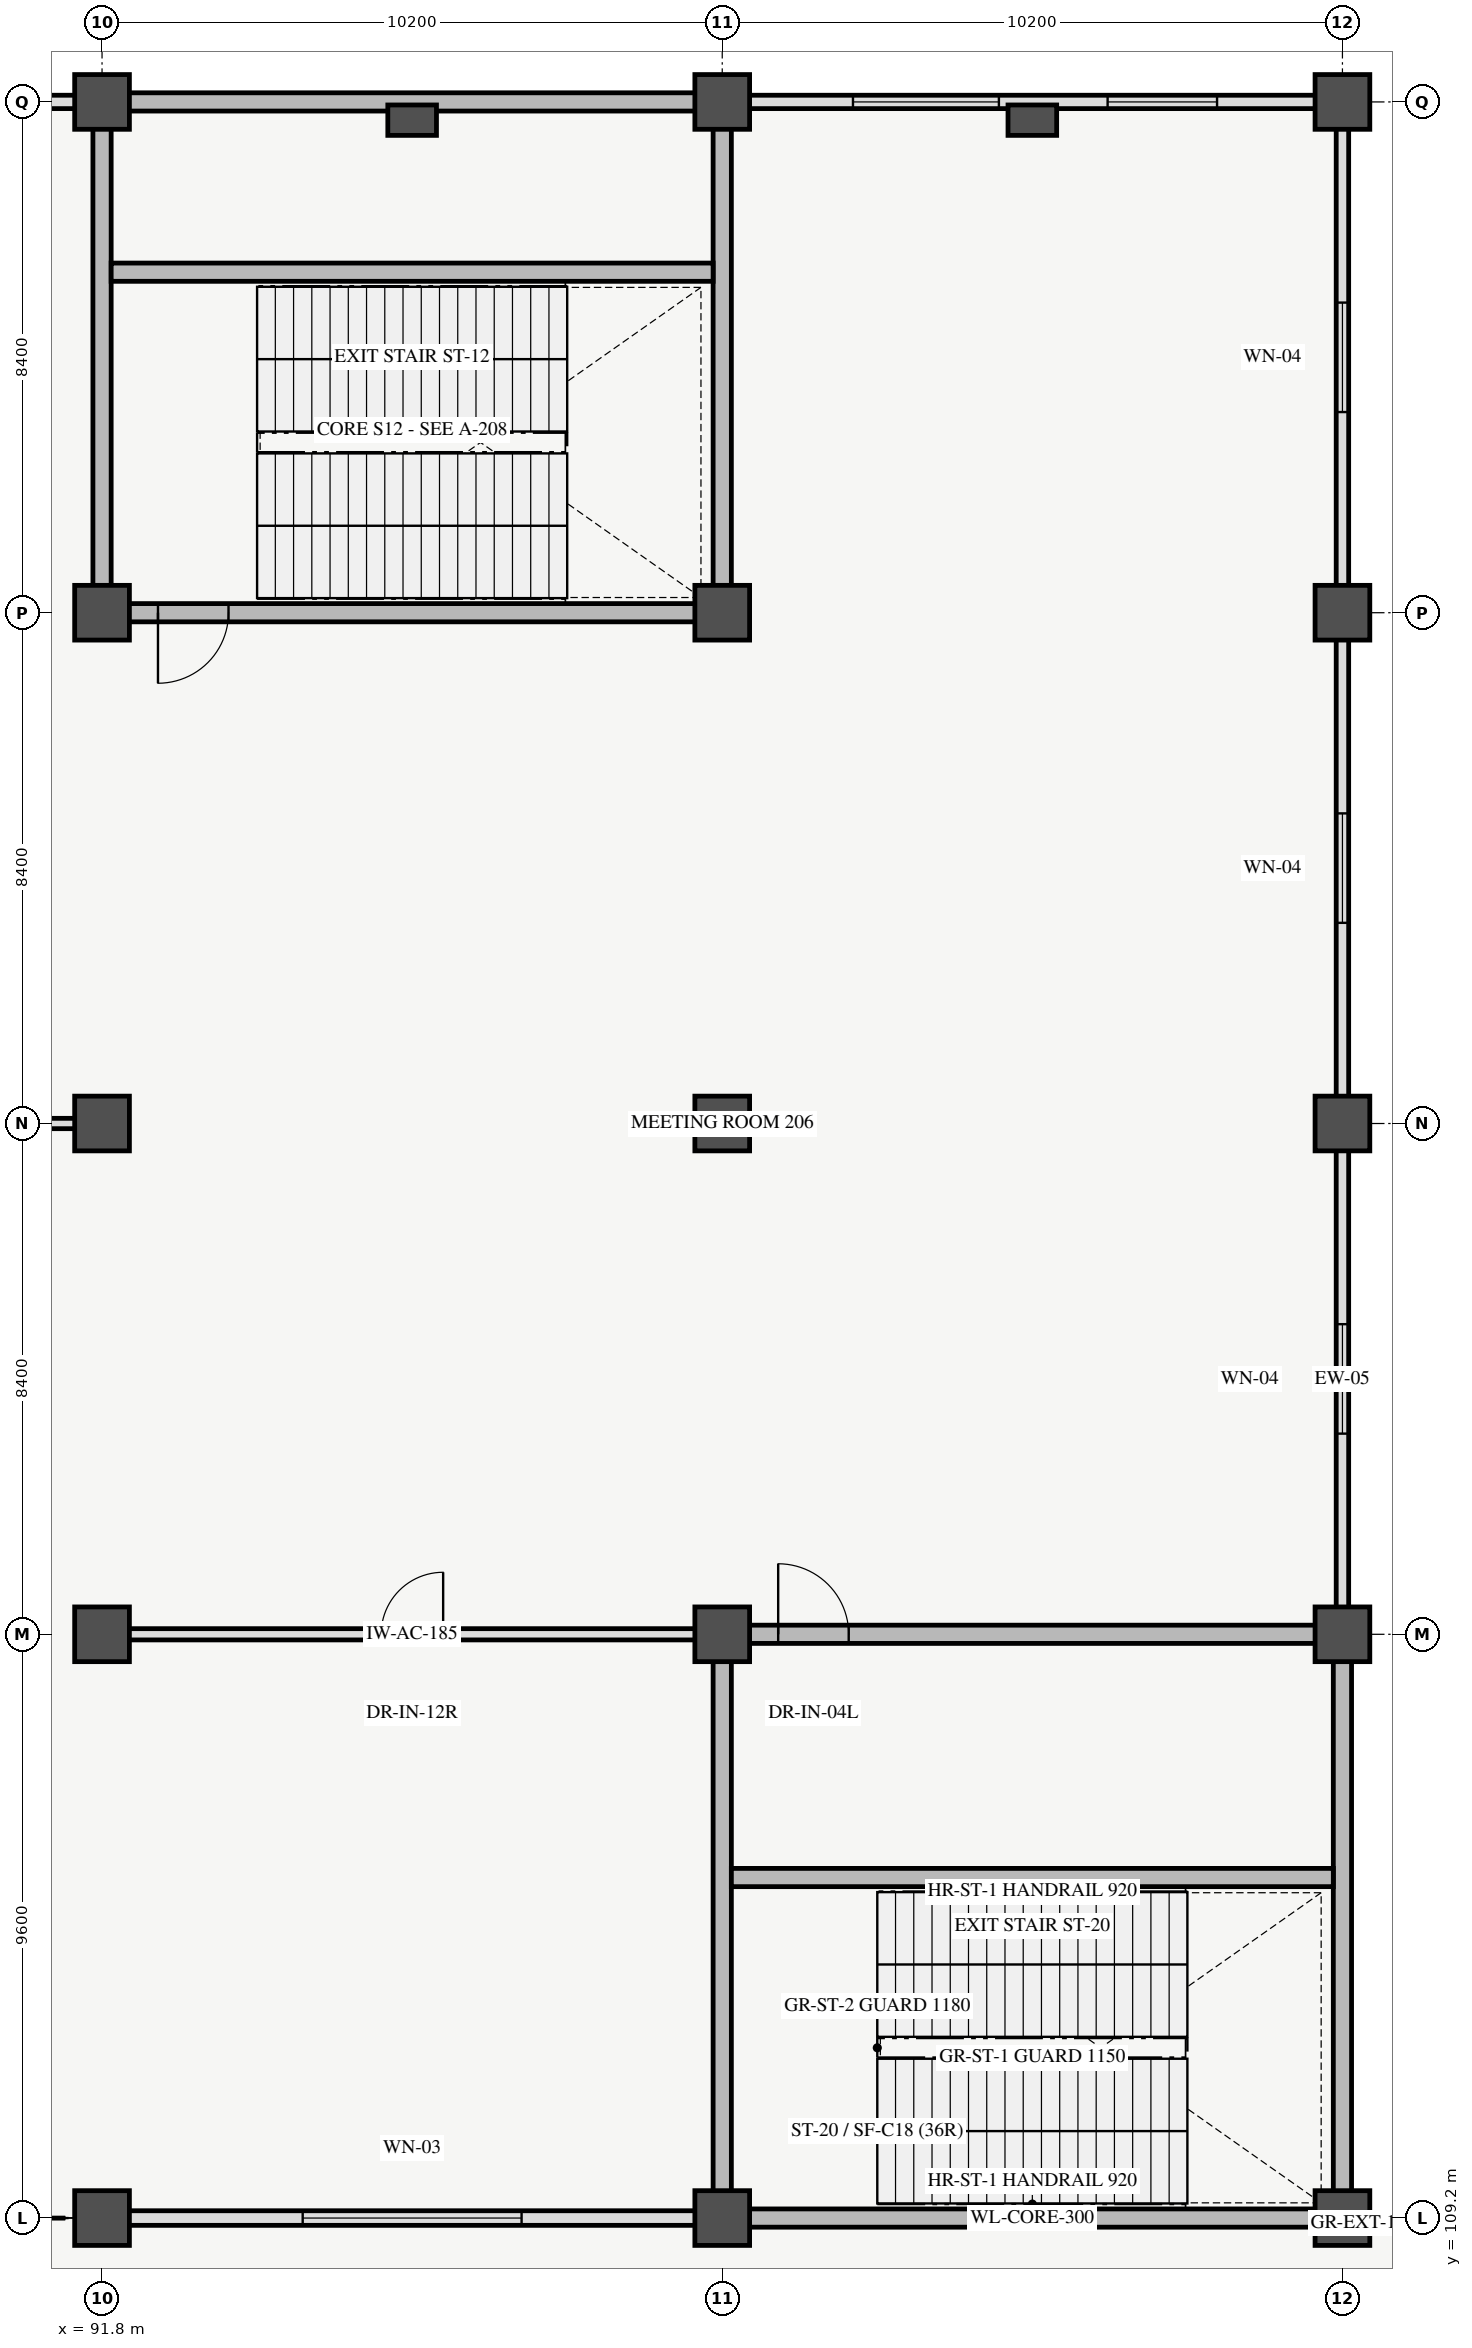
"""IFC4 building model, lengths in metres.
Left out: names, types, materials, properties, quantities, classifications, styles, units other than length and angle.
Written with IfcOpenShell. Run it as: python <this file> out.ifc"""

import sys

from ifc_helpers import new_model, si_unit, direction, frame, frame_2d, origin, origin_2d, place, context, subcontext, project, spatial, rectangle, extrude, element, fill, save


model = new_model("IFC4")
c1 = context("Model", 3, precision=1e-05, world=origin(), true_north=direction((0.0, 1.0)))
c2 = subcontext(c1, "Body", "Model", "MODEL_VIEW")
j1 = project(units=[si_unit("LENGTHUNIT", "METRE"), si_unit("PLANEANGLEUNIT", "RADIAN")], contexts=[c1])
p1 = place(None, origin())
s1 = spatial("IfcSite", under=j1, at=p1, CompositionType="ELEMENT")
p2 = place(p1, origin())
s2 = spatial("IfcBuilding", under=s1, at=p2, CompositionType="ELEMENT")
p3 = place(p2, frame((0.0, 0.0, 5.4)))
s3 = spatial("IfcBuildingStorey", under=s2, at=p3, CompositionType="ELEMENT", Elevation=5.4)
for number, where, z_axis, x_axis in (
    (1, (91.8, 109.2, 0.0), (0.0, 0.0, 1.0), (1.0, 0.0, 0.0)),
    (2, (91.8, 118.8, 0.0), (0.0, 0.0, 1.0), (1.0, 0.0, 0.0)),
    (3, (91.8, 127.2, 0.0), (0.0, 0.0, 1.0), (1.0, 0.0, 0.0)),
    (4, (91.8, 135.6, 0.0), (0.0, 0.0, 1.0), (1.0, 0.0, 0.0)),
    (5, (91.8, 144.0, 0.0), (0.0, 0.0, 1.0), (1.0, 0.0, 0.0)),
    (6, (102.0, 109.2, 0.0), (0.0, 0.0, 1.0), (1.0, 0.0, 0.0)),
    (7, (102.0, 118.8, 0.0), (0.0, 0.0, 1.0), (1.0, 0.0, 0.0)),
    (8, (102.0, 127.2, 0.0), (0.0, 0.0, 1.0), (1.0, 0.0, 0.0)),
    (9, (102.0, 135.6, 0.0), (0.0, 0.0, 1.0), (1.0, 0.0, 0.0)),
    (10, (102.0, 144.0, 0.0), (0.0, 0.0, 1.0), (1.0, 0.0, 0.0)),
    (11, (112.2, 109.2, 0.0), (0.0, 0.0, 1.0), (1.0, 0.0, 0.0)),
    (12, (112.2, 118.8, 0.0), (0.0, 0.0, 1.0), (1.0, 0.0, 0.0)),
    (13, (112.2, 127.2, 0.0), (0.0, 0.0, 1.0), (1.0, 0.0, 0.0)),
    (14, (112.2, 135.6, 0.0), (0.0, 0.0, 1.0), (1.0, 0.0, 0.0)),
    (15, (112.2, 144.0, 0.0), (0.0, 0.0, 1.0), (1.0, 0.0, 0.0)),
):
    element("IfcColumn", number, at=place(p3, frame(where, z_axis=z_axis, x_axis=x_axis)), inside=s3, PredefinedType="COLUMN", context=c2, shape_type="SweptSolid", body=[
        extrude(rectangle(XDim=0.9, YDim=0.9, at=origin_2d()), origin(), (0.0, 0.0, 1.0), 5.4),
    ])
for number, where, z_axis, x_axis in (
    (16, (96.9, 143.7, 0.0), (0.0, 0.0, 1.0), (1.0, 0.0, 0.0)),
    (17, (107.1, 143.7, 0.0), (0.0, 0.0, 1.0), (1.0, 0.0, 0.0)),
):
    element("IfcColumn", number, at=place(p3, frame(where, z_axis=z_axis, x_axis=x_axis)), inside=s3, PredefinedType="PILASTER", context=c2, shape_type="SweptSolid", body=[
        extrude(rectangle(XDim=0.8, YDim=0.5, at=origin_2d()), origin(), (0.0, 0.0, 1.0), 5.4),
    ])
p4 = place(p3, frame((81.84, 144.0, 0.0), z_axis=(0.0, 0.0, 1.0), x_axis=(1.0, 0.0, 0.0)))
e18 = element("IfcWall", 18, at=p4, inside=s3, PredefinedType="STANDARD", context=c2, shape_type="SweptSolid", body=[
    extrude(rectangle(XDim=9.72, YDim=0.22, at=frame_2d((4.86, 0.0))), origin(), (0.0, 0.0, 1.0), 4.32),
])
p5 = place(p4, frame((1.91, 0.0, 0.7)))
e19 = element("IfcOpeningElement", 19, at=p5, cuts=e18, PredefinedType="OPENING", context=c2, shape_type="SweptSolid", body=[
    extrude(rectangle(XDim=2.4, YDim=2.1, at=frame_2d((1.2, 1.05))), frame((0.0, 0.12, 0.0), z_axis=(0.0, -1.0, 0.0), x_axis=(1.0, 0.0, 0.0)), (0.0, 0.0, 1.0), 0.24),
])
p6 = place(p4, frame((6.098, 0.0, 0.85)))
e20 = element("IfcOpeningElement", 20, at=p6, cuts=e18, PredefinedType="OPENING", context=c2, shape_type="SweptSolid", body=[
    extrude(rectangle(XDim=1.8, YDim=1.8, at=frame_2d((0.9, 0.9))), frame((0.0, 0.12, 0.0), z_axis=(0.0, -1.0, 0.0), x_axis=(1.0, 0.0, 0.0)), (0.0, 0.0, 1.0), 0.24),
])
p7 = place(p3, frame((92.04, 109.2, 0.0), z_axis=(0.0, 0.0, 1.0), x_axis=(1.0, 0.0, 0.0)))
e21 = element("IfcWall", 21, at=p7, inside=s3, PredefinedType="STANDARD", context=c2, shape_type="SweptSolid", body=[
    extrude(rectangle(XDim=9.72, YDim=0.24, at=frame_2d((4.86, 0.0))), origin(), (0.0, 0.0, 1.0), 4.32),
])
p8 = place(p7, frame((3.06, 0.0, 0.9)))
e22 = element("IfcOpeningElement", 22, at=p8, cuts=e21, PredefinedType="OPENING", context=c2, shape_type="SweptSolid", body=[
    extrude(rectangle(XDim=3.6, YDim=2.1, at=frame_2d((1.8, 1.05))), frame((0.0, 0.13, 0.0), z_axis=(0.0, -1.0, 0.0), x_axis=(1.0, 0.0, 0.0)), (0.0, 0.0, 1.0), 0.26),
])
p9 = place(p3, frame((102.24, 144.0, 0.0), z_axis=(0.0, 0.0, 1.0), x_axis=(1.0, 0.0, 0.0)))
e23 = element("IfcWall", 23, at=p9, inside=s3, PredefinedType="STANDARD", context=c2, shape_type="SweptSolid", body=[
    extrude(rectangle(XDim=9.72, YDim=0.22, at=frame_2d((4.86, 0.0))), origin(), (0.0, 0.0, 1.0), 4.32),
])
p10 = place(p9, frame((1.91, 0.0, 0.7)))
e24 = element("IfcOpeningElement", 24, at=p10, cuts=e23, PredefinedType="OPENING", context=c2, shape_type="SweptSolid", body=[
    extrude(rectangle(XDim=2.4, YDim=2.1, at=frame_2d((1.2, 1.05))), frame((0.0, 0.12, 0.0), z_axis=(0.0, -1.0, 0.0), x_axis=(1.0, 0.0, 0.0)), (0.0, 0.0, 1.0), 0.24),
])
p11 = place(p9, frame((6.098, 0.0, 0.85)))
e25 = element("IfcOpeningElement", 25, at=p11, cuts=e23, PredefinedType="OPENING", context=c2, shape_type="SweptSolid", body=[
    extrude(rectangle(XDim=1.8, YDim=1.8, at=frame_2d((0.9, 0.9))), frame((0.0, 0.12, 0.0), z_axis=(0.0, -1.0, 0.0), x_axis=(1.0, 0.0, 0.0)), (0.0, 0.0, 1.0), 0.24),
])
p12 = place(p3, frame((112.2, 119.04, 0.0), z_axis=(0.0, 0.0, 1.0), x_axis=(0.0, 1.0, 0.0)))
e26 = element("IfcWall", 26, at=p12, inside=s3, PredefinedType="STANDARD", context=c2, shape_type="SweptSolid", body=[
    extrude(rectangle(XDim=7.92, YDim=0.205, at=frame_2d((3.96, 0.0))), origin(), (0.0, 0.0, 1.0), 4.32),
])
p13 = place(p12, frame((3.06, 0.0, 0.95)))
e27 = element("IfcOpeningElement", 27, at=p13, cuts=e26, PredefinedType="OPENING", context=c2, shape_type="SweptSolid", body=[
    extrude(rectangle(XDim=1.8, YDim=1.8, at=frame_2d((0.9, 0.9))), frame((0.0, 0.113, 0.0), z_axis=(0.0, -1.0, 0.0), x_axis=(1.0, 0.0, 0.0)), (0.0, 0.0, 1.0), 0.225),
])
p14 = place(p3, frame((112.2, 127.44, 0.0), z_axis=(0.0, 0.0, 1.0), x_axis=(0.0, 1.0, 0.0)))
e28 = element("IfcWall", 28, at=p14, inside=s3, PredefinedType="STANDARD", context=c2, shape_type="SweptSolid", body=[
    extrude(rectangle(XDim=7.92, YDim=0.205, at=frame_2d((3.96, 0.0))), origin(), (0.0, 0.0, 1.0), 4.32),
])
p15 = place(p14, frame((3.06, 0.0, 0.95)))
e29 = element("IfcOpeningElement", 29, at=p15, cuts=e28, PredefinedType="OPENING", context=c2, shape_type="SweptSolid", body=[
    extrude(rectangle(XDim=1.8, YDim=1.8, at=frame_2d((0.9, 0.9))), frame((0.0, 0.113, 0.0), z_axis=(0.0, -1.0, 0.0), x_axis=(1.0, 0.0, 0.0)), (0.0, 0.0, 1.0), 0.225),
])
p16 = place(p3, frame((112.2, 135.84, 0.0), z_axis=(0.0, 0.0, 1.0), x_axis=(0.0, 1.0, 0.0)))
e30 = element("IfcWall", 30, at=p16, inside=s3, PredefinedType="STANDARD", context=c2, shape_type="SweptSolid", body=[
    extrude(rectangle(XDim=7.92, YDim=0.205, at=frame_2d((3.96, 0.0))), origin(), (0.0, 0.0, 1.0), 4.32),
])
p17 = place(p16, frame((3.06, 0.0, 0.95)))
e31 = element("IfcOpeningElement", 31, at=p17, cuts=e30, PredefinedType="OPENING", context=c2, shape_type="SweptSolid", body=[
    extrude(rectangle(XDim=1.8, YDim=1.8, at=frame_2d((0.9, 0.9))), frame((0.0, 0.113, 0.0), z_axis=(0.0, -1.0, 0.0), x_axis=(1.0, 0.0, 0.0)), (0.0, 0.0, 1.0), 0.225),
])
p18 = place(p3, frame((91.8, 135.6, 0.0), z_axis=(0.0, 0.0, 1.0), x_axis=(1.0, 0.0, 0.0)))
e32 = element("IfcWall", 32, at=p18, inside=s3, PredefinedType="SHEAR", context=c2, shape_type="SweptSolid", body=[
    extrude(rectangle(XDim=10.2, YDim=0.3, at=frame_2d((5.1, 0.0))), origin(), (0.0, 0.0, 1.0), 5.4),
])
p19 = place(p18, frame((0.92, 0.0, 0.0)))
e33 = element("IfcOpeningElement", 33, at=p19, cuts=e32, PredefinedType="OPENING", context=c2, shape_type="SweptSolid", body=[
    extrude(rectangle(XDim=1.16, YDim=2.2, at=frame_2d((0.58, 1.1))), frame((0.0, 0.16, 0.0), z_axis=(0.0, -1.0, 0.0), x_axis=(1.0, 0.0, 0.0)), (0.0, 0.0, 1.0), 0.32),
])
p20 = place(p3, frame((91.8, 144.0, 0.0), z_axis=(0.0, 0.0, 1.0), x_axis=(1.0, 0.0, 0.0)))
e34 = element("IfcWall", 34, at=p20, inside=s3, PredefinedType="SHEAR", context=c2, shape_type="SweptSolid", body=[
    extrude(rectangle(XDim=10.2, YDim=0.3, at=frame_2d((5.1, 0.0))), origin(), (0.0, 0.0, 1.0), 5.4),
])
for number, where, z_axis, x_axis in (
    (35, (91.8, 135.6, 0.0), (0.0, 0.0, 1.0), (0.0, 1.0, 0.0)),
    (36, (102.0, 135.6, 0.0), (0.0, 0.0, 1.0), (0.0, 1.0, 0.0)),
):
    element("IfcWall", number, at=place(p3, frame(where, z_axis=z_axis, x_axis=x_axis)), inside=s3, PredefinedType="SHEAR", context=c2, shape_type="SweptSolid", body=[
        extrude(rectangle(XDim=8.4, YDim=0.3, at=frame_2d((4.2, 0.0))), origin(), (0.0, 0.0, 1.0), 5.4),
    ])
p21 = place(p3, frame((91.95, 141.2, 0.0), z_axis=(0.0, 0.0, 1.0), x_axis=(1.0, 0.0, 0.0)))
e37 = element("IfcWall", 37, at=p21, inside=s3, PredefinedType="SHEAR", context=c2, shape_type="SweptSolid", body=[
    extrude(rectangle(XDim=9.9, YDim=0.3, at=frame_2d((4.95, 0.0))), origin(), (0.0, 0.0, 1.0), 5.4),
])
p22 = place(p3, frame((102.0, 109.2, 0.0), z_axis=(0.0, 0.0, 1.0), x_axis=(1.0, 0.0, 0.0)))
e38 = element("IfcWall", 38, at=p22, inside=s3, PredefinedType="SHEAR", context=c2, shape_type="SweptSolid", body=[
    extrude(rectangle(XDim=10.2, YDim=0.3, at=frame_2d((5.1, 0.0))), origin(), (0.0, 0.0, 1.0), 5.4),
])
p23 = place(p3, frame((102.0, 118.8, 0.0), z_axis=(0.0, 0.0, 1.0), x_axis=(1.0, 0.0, 0.0)))
e39 = element("IfcWall", 39, at=p23, inside=s3, PredefinedType="SHEAR", context=c2, shape_type="SweptSolid", body=[
    extrude(rectangle(XDim=10.2, YDim=0.3, at=frame_2d((5.1, 0.0))), origin(), (0.0, 0.0, 1.0), 5.4),
])
p24 = place(p23, frame((0.92, 0.0, 0.0)))
e40 = element("IfcOpeningElement", 40, at=p24, cuts=e39, PredefinedType="OPENING", context=c2, shape_type="SweptSolid", body=[
    extrude(rectangle(XDim=1.16, YDim=2.2, at=frame_2d((0.58, 1.1))), frame((0.0, 0.16, 0.0), z_axis=(0.0, -1.0, 0.0), x_axis=(1.0, 0.0, 0.0)), (0.0, 0.0, 1.0), 0.32),
])
for number, where, z_axis, x_axis in (
    (41, (102.0, 109.2, 0.0), (0.0, 0.0, 1.0), (0.0, 1.0, 0.0)),
    (42, (112.2, 109.2, 0.0), (0.0, 0.0, 1.0), (0.0, 1.0, 0.0)),
):
    element("IfcWall", number, at=place(p3, frame(where, z_axis=z_axis, x_axis=x_axis)), inside=s3, PredefinedType="SHEAR", context=c2, shape_type="SweptSolid", body=[
        extrude(rectangle(XDim=9.6, YDim=0.3, at=frame_2d((4.8, 0.0))), origin(), (0.0, 0.0, 1.0), 5.4),
    ])
p25 = place(p3, frame((102.15, 114.8, 0.0), z_axis=(0.0, 0.0, 1.0), x_axis=(1.0, 0.0, 0.0)))
e43 = element("IfcWall", 43, at=p25, inside=s3, PredefinedType="SHEAR", context=c2, shape_type="SweptSolid", body=[
    extrude(rectangle(XDim=9.9, YDim=0.3, at=frame_2d((4.95, 0.0))), origin(), (0.0, 0.0, 1.0), 5.4),
])
p26 = place(p3, frame((82.0, 127.2, 0.0), z_axis=(0.0, 0.0, 1.0), x_axis=(1.0, 0.0, 0.0)))
e44 = element("IfcWall", 44, at=p26, inside=s3, PredefinedType="MOVABLE", context=c2, shape_type="SweptSolid", body=[
    extrude(rectangle(XDim=9.4, YDim=0.17, at=frame_2d((4.7, 0.0))), origin(), (0.0, 0.0, 1.0), 4.2),
])
p27 = place(p26, frame((3.675, 0.0, 0.0)))
e45 = element("IfcOpeningElement", 45, at=p27, cuts=e44, PredefinedType="OPENING", context=c2, shape_type="SweptSolid", body=[
    extrude(rectangle(XDim=2.05, YDim=2.36, at=frame_2d((1.025, 1.18))), frame((0.0, 0.095, 0.0), z_axis=(0.0, -1.0, 0.0), x_axis=(1.0, 0.0, 0.0)), (0.0, 0.0, 1.0), 0.19),
])
p28 = place(p3, frame((92.2, 118.8, 0.0), z_axis=(0.0, 0.0, 1.0), x_axis=(1.0, 0.0, 0.0)))
e46 = element("IfcWall", 46, at=p28, inside=s3, PredefinedType="PARTITIONING", context=c2, shape_type="SweptSolid", body=[
    extrude(rectangle(XDim=9.4, YDim=0.185, at=frame_2d((4.7, 0.0))), origin(), (0.0, 0.0, 1.0), 4.2),
])
p29 = place(p28, frame((4.19, 0.0, 0.0)))
e47 = element("IfcOpeningElement", 47, at=p29, cuts=e46, PredefinedType="OPENING", context=c2, shape_type="SweptSolid", body=[
    extrude(rectangle(XDim=1.02, YDim=2.12, at=frame_2d((0.51, 1.06))), frame((0.0, 0.103, 0.0), z_axis=(0.0, -1.0, 0.0), x_axis=(1.0, 0.0, 0.0)), (0.0, 0.0, 1.0), 0.205),
])
p30 = place(p8, origin())
e48 = element("IfcWindow", 48, at=p30, inside=s3, PartitioningType="TRIPLE_PANEL_VERTICAL", PredefinedType="WINDOW", context=c2, shape_type="SweptSolid", body=[
    extrude(rectangle(XDim=3.6, YDim=2.1, at=frame_2d((1.8, 1.05))), frame((0.0, 0.03, 0.0), z_axis=(0.0, -1.0, 0.0), x_axis=(1.0, 0.0, 0.0)), (0.0, 0.0, 1.0), 0.06),
])
fill(e22, e48)
p31 = place(p10, origin())
e49 = element("IfcWindow", 49, at=p31, inside=s3, PartitioningType="DOUBLE_PANEL_VERTICAL", PredefinedType="WINDOW", context=c2, shape_type="SweptSolid", body=[
    extrude(rectangle(XDim=2.4, YDim=2.1, at=frame_2d((1.2, 1.05))), frame((0.0, 0.03, 0.0), z_axis=(0.0, -1.0, 0.0), x_axis=(1.0, 0.0, 0.0)), (0.0, 0.0, 1.0), 0.06),
])
fill(e24, e49)
p32 = place(p11, origin())
e50 = element("IfcWindow", 50, at=p32, inside=s3, PartitioningType="DOUBLE_PANEL_VERTICAL", PredefinedType="WINDOW", context=c2, shape_type="SweptSolid", body=[
    extrude(rectangle(XDim=1.8, YDim=1.8, at=frame_2d((0.9, 0.9))), frame((0.0, 0.03, 0.0), z_axis=(0.0, -1.0, 0.0), x_axis=(1.0, 0.0, 0.0)), (0.0, 0.0, 1.0), 0.06),
])
fill(e25, e50)
p33 = place(p13, origin())
e51 = element("IfcWindow", 51, at=p33, inside=s3, PartitioningType="DOUBLE_PANEL_VERTICAL", PredefinedType="WINDOW", context=c2, shape_type="SweptSolid", body=[
    extrude(rectangle(XDim=1.8, YDim=1.8, at=frame_2d((0.9, 0.9))), frame((0.0, 0.03, 0.0), z_axis=(0.0, -1.0, 0.0), x_axis=(1.0, 0.0, 0.0)), (0.0, 0.0, 1.0), 0.06),
])
fill(e27, e51)
p34 = place(p15, origin())
e52 = element("IfcWindow", 52, at=p34, inside=s3, PartitioningType="DOUBLE_PANEL_VERTICAL", PredefinedType="WINDOW", context=c2, shape_type="SweptSolid", body=[
    extrude(rectangle(XDim=1.8, YDim=1.8, at=frame_2d((0.9, 0.9))), frame((0.0, 0.03, 0.0), z_axis=(0.0, -1.0, 0.0), x_axis=(1.0, 0.0, 0.0)), (0.0, 0.0, 1.0), 0.06),
])
fill(e29, e52)
p35 = place(p17, origin())
e53 = element("IfcWindow", 53, at=p35, inside=s3, PartitioningType="DOUBLE_PANEL_VERTICAL", PredefinedType="WINDOW", context=c2, shape_type="SweptSolid", body=[
    extrude(rectangle(XDim=1.8, YDim=1.8, at=frame_2d((0.9, 0.9))), frame((0.0, 0.03, 0.0), z_axis=(0.0, -1.0, 0.0), x_axis=(1.0, 0.0, 0.0)), (0.0, 0.0, 1.0), 0.06),
])
fill(e31, e53)
p36 = place(p19, origin())
e54 = element("IfcDoor", 54, at=p36, inside=s3, OperationType="SINGLE_SWING_LEFT", PredefinedType="DOOR", context=c2, shape_type="SweptSolid", body=[
    extrude(rectangle(XDim=1.16, YDim=2.2, at=frame_2d((0.58, 1.1))), frame((0.0, 0.025, 0.0), z_axis=(0.0, -1.0, 0.0), x_axis=(1.0, 0.0, 0.0)), (0.0, 0.0, 1.0), 0.05),
])
fill(e33, e54)
p37 = place(p24, origin())
e55 = element("IfcDoor", 55, at=p37, inside=s3, OperationType="SINGLE_SWING_LEFT", PredefinedType="DOOR", context=c2, shape_type="SweptSolid", body=[
    extrude(rectangle(XDim=1.16, YDim=2.2, at=frame_2d((0.58, 1.1))), frame((0.0, 0.025, 0.0), z_axis=(0.0, -1.0, 0.0), x_axis=(1.0, 0.0, 0.0)), (0.0, 0.0, 1.0), 0.05),
])
fill(e40, e55)
p38 = place(p29, origin())
e56 = element("IfcDoor", 56, at=p38, inside=s3, OperationType="SINGLE_SWING_RIGHT", PredefinedType="DOOR", context=c2, shape_type="SweptSolid", body=[
    extrude(rectangle(XDim=1.02, YDim=2.12, at=frame_2d((0.51, 1.06))), frame((0.0, 0.025, 0.0), z_axis=(0.0, -1.0, 0.0), x_axis=(1.0, 0.0, 0.0)), (0.0, 0.0, 1.0), 0.05),
])
fill(e47, e56)
save(model, sys.argv[1])
